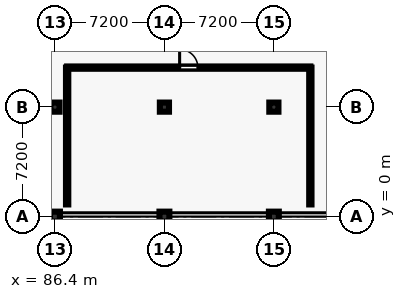
"""IFC4 building model, lengths in metres.
Left out: names, types, materials, properties, quantities, classifications, styles, units other than length and angle.
Written with IfcOpenShell. Run it as: python <this file> out.ifc"""

import sys

from ifc_helpers import new_model, si_unit, direction, frame, frame_2d, origin, origin_2d, place, context, subcontext, project, spatial, rectangle, extrude, element, fill, save


model = new_model("IFC4")
c1 = context("Model", 3, precision=1e-05, world=origin(), true_north=direction((0.0, 1.0)))
c2 = subcontext(c1, "Body", "Model", "MODEL_VIEW")
j1 = project(units=[si_unit("LENGTHUNIT", "METRE"), si_unit("PLANEANGLEUNIT", "RADIAN")], contexts=[c1])
p1 = place(None, origin())
s1 = spatial("IfcSite", under=j1, at=p1, CompositionType="ELEMENT")
p2 = place(p1, origin())
s2 = spatial("IfcBuilding", under=s1, at=p2, CompositionType="ELEMENT")
p3 = place(p2, frame((0.0, 0.0, 13.8)))
s3 = spatial("IfcBuildingStorey", under=s2, at=p3, CompositionType="ELEMENT", Elevation=13.8)
p4 = place(p3, frame((86.4, 0.0, 0.0), z_axis=(0.0, 0.0, 1.0), x_axis=(1.0, 0.0, 0.0)))
e1 = element("IfcColumn", 1, at=p4, inside=s3, PredefinedType="COLUMN", context=c2, shape_type="SweptSolid", body=[
    extrude(rectangle(XDim=0.65, YDim=0.65, at=origin_2d()), origin(), (0.0, 0.0, 1.0), 4.8),
])
p5 = place(p3, frame((86.4, 7.2, 0.0), z_axis=(0.0, 0.0, 1.0), x_axis=(1.0, 0.0, 0.0)))
e2 = element("IfcColumn", 2, at=p5, inside=s3, PredefinedType="COLUMN", context=c2, shape_type="SweptSolid", body=[
    extrude(rectangle(XDim=0.6, YDim=0.6, at=origin_2d()), origin(), (0.0, 0.0, 1.0), 4.8),
])
p6 = place(p3, frame((93.6, 0.0, 0.0), z_axis=(0.0, 0.0, 1.0), x_axis=(1.0, 0.0, 0.0)))
e3 = element("IfcColumn", 3, at=p6, inside=s3, PredefinedType="COLUMN", context=c2, shape_type="SweptSolid", body=[
    extrude(rectangle(XDim=0.65, YDim=0.65, at=origin_2d()), origin(), (0.0, 0.0, 1.0), 4.8),
])
p7 = place(p3, frame((93.6, 7.2, 0.0), z_axis=(0.0, 0.0, 1.0), x_axis=(1.0, 0.0, 0.0)))
e4 = element("IfcColumn", 4, at=p7, inside=s3, PredefinedType="COLUMN", context=c2, shape_type="SweptSolid", body=[
    extrude(rectangle(XDim=0.6, YDim=0.6, at=origin_2d()), origin(), (0.0, 0.0, 1.0), 4.8),
])
p8 = place(p3, frame((100.8, 0.0, 0.0), z_axis=(0.0, 0.0, 1.0), x_axis=(1.0, 0.0, 0.0)))
e5 = element("IfcColumn", 5, at=p8, inside=s3, PredefinedType="COLUMN", context=c2, shape_type="SweptSolid", body=[
    extrude(rectangle(XDim=0.65, YDim=0.65, at=origin_2d()), origin(), (0.0, 0.0, 1.0), 4.8),
])
p9 = place(p3, frame((100.8, 7.2, 0.0), z_axis=(0.0, 0.0, 1.0), x_axis=(1.0, 0.0, 0.0)))
e6 = element("IfcColumn", 6, at=p9, inside=s3, PredefinedType="COLUMN", context=c2, shape_type="SweptSolid", body=[
    extrude(rectangle(XDim=0.6, YDim=0.6, at=origin_2d()), origin(), (0.0, 0.0, 1.0), 4.8),
])
p10 = place(p3, frame((103.2, 0.8, 0.0), z_axis=(0.0, 0.0, 1.0), x_axis=(0.0, 1.0, 0.0)))
e7 = element("IfcWall", 7, at=p10, inside=s3, PredefinedType="PARTITIONING", context=c2, shape_type="SweptSolid", body=[
    extrude(rectangle(XDim=9.0, YDim=0.15, at=frame_2d((4.5, 0.0))), origin(), (0.0, 0.0, 1.0), 3.59),
])
p11 = place(p3, frame((103.2, 9.8, 0.0), z_axis=(0.0, 0.0, 1.0), x_axis=(-1.0, 0.0, 0.0)))
e8 = element("IfcWall", 8, at=p11, inside=s3, PredefinedType="PARTITIONING", context=c2, shape_type="SweptSolid", body=[
    extrude(rectangle(XDim=16.0, YDim=0.15, at=frame_2d((8.0, 0.0))), origin(), (0.0, 0.0, 1.0), 3.59),
])
p12 = place(p11, frame((7.4, 0.0, 0.0)))
e9 = element("IfcOpeningElement", 9, at=p12, cuts=e8, PredefinedType="OPENING", context=c2, shape_type="SweptSolid", body=[
    extrude(rectangle(XDim=1.2, YDim=2.2, at=frame_2d((0.6, 1.1))), frame((0.0, 0.085, 0.0), z_axis=(0.0, -1.0, 0.0), x_axis=(1.0, 0.0, 0.0)), (0.0, 0.0, 1.0), 0.17),
])
p13 = place(p3, frame((87.2, 9.8, 0.0), z_axis=(0.0, 0.0, 1.0), x_axis=(0.0, -1.0, 0.0)))
e10 = element("IfcWall", 10, at=p13, inside=s3, PredefinedType="PARTITIONING", context=c2, shape_type="SweptSolid", body=[
    extrude(rectangle(XDim=9.0, YDim=0.15, at=frame_2d((4.5, 0.0))), origin(), (0.0, 0.0, 1.0), 3.59),
])
p14 = place(p12, frame((1.2, 0.0, 0.0), z_axis=(0.0, 0.0, 1.0), x_axis=(-1.0, 0.0, 0.0)))
e11 = element("IfcDoor", 11, at=p14, inside=s3, OperationType="SINGLE_SWING_RIGHT", PredefinedType="DOOR", context=c2, shape_type="SweptSolid", body=[
    extrude(rectangle(XDim=1.2, YDim=2.2, at=frame_2d((0.6, 1.1))), frame((0.0, 0.025, 0.0), z_axis=(0.0, -1.0, 0.0), x_axis=(1.0, 0.0, 0.0)), (0.0, 0.0, 1.0), 0.05),
])
fill(e9, e11)
save(model, sys.argv[1])
